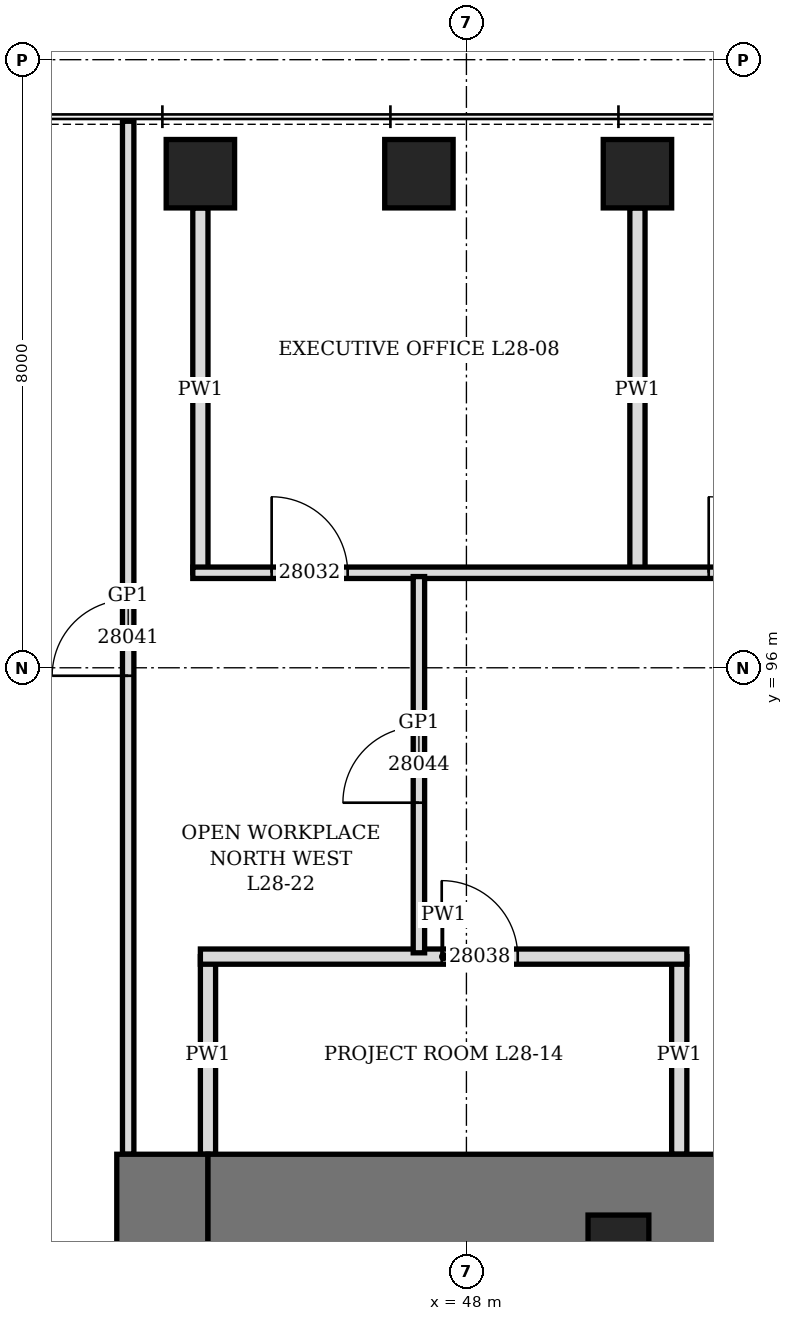
"""IFC4 building model, lengths in metres.
Left out: names, types, materials, properties, quantities, classifications, styles, units other than length and angle.
Written with IfcOpenShell. Run it as: python <this file> out.ifc"""

import sys

from ifc_helpers import new_model, si_unit, direction, frame, frame_2d, origin, origin_2d, place, context, subcontext, project, spatial, rectangle, hollow_rectangle, extrude, element, fill, save


model = new_model("IFC4")
c1 = context("Model", 3, precision=1e-05, world=origin(), true_north=direction((0.0, 1.0)))
c2 = subcontext(c1, "Body", "Model", "MODEL_VIEW")
j1 = project(units=[si_unit("LENGTHUNIT", "METRE"), si_unit("PLANEANGLEUNIT", "RADIAN")], contexts=[c1])
p1 = place(None, origin())
s1 = spatial("IfcSite", under=j1, at=p1, CompositionType="ELEMENT")
p2 = place(p1, origin())
s2 = spatial("IfcBuilding", under=s1, at=p2, CompositionType="ELEMENT")
p3 = place(p2, frame((0.0, 0.0, 129.1)))
s3 = spatial("IfcBuildingStorey", under=s2, at=p3, CompositionType="ELEMENT", Elevation=129.1)
for number, where, z_axis, x_axis in (
    (1, (50.25, 102.5, 0.0), (0.0, 0.0, 1.0), (1.0, 0.0, 0.0)),
    (2, (47.375, 102.5, 0.0), (0.0, 0.0, 1.0), (1.0, 0.0, 0.0)),
    (3, (44.5, 102.5, 0.0), (0.0, 0.0, 1.0), (1.0, 0.0, 0.0)),
):
    element("IfcColumn", number, at=place(p3, frame(where, z_axis=z_axis, x_axis=x_axis)), inside=s3, PredefinedType="COLUMN", context=c2, shape_type="SweptSolid", body=[
        extrude(hollow_rectangle(XDim=0.9, YDim=0.9, WallThickness=0.15, at=origin_2d()), origin(), (0.0, 0.0, 1.0), 4.2),
    ])
p4 = place(p3, frame((44.0, 70.4, 0.0), z_axis=(0.0, 0.0, 1.0), x_axis=(0.0, 1.0, 0.0)))
e4 = element("IfcWall", 4, at=p4, inside=s3, PredefinedType="SHEAR", context=c2, shape_type="SweptSolid", body=[
    extrude(rectangle(XDim=19.2, YDim=1.2, at=frame_2d((9.6, 0.0))), origin(), (0.0, 0.0, 1.0), 4.2),
])
p5 = place(p4, frame((8.6, 0.0, 0.0)))
e5 = element("IfcOpeningElement", 5, at=p5, cuts=e4, PredefinedType="OPENING", context=c2, shape_type="SweptSolid", body=[
    extrude(rectangle(XDim=2.0, YDim=2.4, at=frame_2d((1.0, 1.2))), frame((0.0, 0.61, 0.0), z_axis=(0.0, -1.0, 0.0), x_axis=(1.0, 0.0, 0.0)), (0.0, 0.0, 1.0), 1.22),
])
p6 = place(p3, frame((44.6, 89.0, 0.0), z_axis=(0.0, 0.0, 1.0), x_axis=(1.0, 0.0, 0.0)))
e6 = element("IfcWall", 6, at=p6, inside=s3, PredefinedType="SHEAR", context=c2, shape_type="SweptSolid", body=[
    extrude(rectangle(XDim=22.8, YDim=1.2, at=frame_2d((11.4, 0.0))), origin(), (0.0, 0.0, 1.0), 4.2),
])
p7 = place(p6, frame((7.9, 0.0, 0.0)))
e7 = element("IfcOpeningElement", 7, at=p7, cuts=e6, PredefinedType="OPENING", context=c2, shape_type="SweptSolid", body=[
    extrude(rectangle(XDim=1.0, YDim=2.1, at=frame_2d((0.5, 1.05))), frame((0.0, 0.61, 0.0), z_axis=(0.0, -1.0, 0.0), x_axis=(1.0, 0.0, 0.0)), (0.0, 0.0, 1.0), 1.22),
])
p8 = place(p6, frame((12.025, 0.0, 0.0)))
e8 = element("IfcOpeningElement", 8, at=p8, cuts=e6, PredefinedType="OPENING", context=c2, shape_type="SweptSolid", body=[
    extrude(rectangle(XDim=0.9, YDim=2.1, at=frame_2d((0.45, 1.05))), frame((0.0, 0.61, 0.0), z_axis=(0.0, -1.0, 0.0), x_axis=(1.0, 0.0, 0.0)), (0.0, 0.0, 1.0), 1.22),
])
p9 = place(p6, frame((13.962, 0.0, 0.0)))
e9 = element("IfcOpeningElement", 9, at=p9, cuts=e6, PredefinedType="OPENING", context=c2, shape_type="SweptSolid", body=[
    extrude(rectangle(XDim=0.9, YDim=2.1, at=frame_2d((0.45, 1.05))), frame((0.0, 0.61, 0.0), z_axis=(0.0, -1.0, 0.0), x_axis=(1.0, 0.0, 0.0)), (0.0, 0.0, 1.0), 1.22),
])
p10 = place(p3, frame((50.0, 88.4, 0.0), z_axis=(0.0, 0.0, 1.0), x_axis=(1.0, 0.0, 0.0)))
e10 = element("IfcColumn", 10, at=p10, inside=s3, PredefinedType="COLUMN", context=c2, shape_type="SweptSolid", body=[
    extrude(hollow_rectangle(XDim=0.8, YDim=0.8, WallThickness=0.1, at=origin_2d()), origin(), (0.0, 0.0, 1.0), 4.2),
])
p11 = place(p3, frame((44.5, 97.25, 0.0), z_axis=(0.0, 0.0, 1.0), x_axis=(0.0, 1.0, 0.0)))
e11 = element("IfcWall", 11, at=p11, inside=s3, PredefinedType="PARTITIONING", context=c2, shape_type="SweptSolid", body=[
    extrude(rectangle(XDim=4.8, YDim=0.2, at=frame_2d((2.4, 0.0))), origin(), (0.0, 0.0, 1.0), 2.74),
])
p12 = place(p3, frame((50.25, 97.25, 0.0), z_axis=(0.0, 0.0, 1.0), x_axis=(0.0, 1.0, 0.0)))
e12 = element("IfcWall", 12, at=p12, inside=s3, PredefinedType="PARTITIONING", context=c2, shape_type="SweptSolid", body=[
    extrude(rectangle(XDim=4.8, YDim=0.2, at=frame_2d((2.4, 0.0))), origin(), (0.0, 0.0, 1.0), 3.278),
])
p13 = place(p3, frame((44.6, 89.6, 0.0), z_axis=(0.0, 0.0, 1.0), x_axis=(0.0, 1.0, 0.0)))
e13 = element("IfcWall", 13, at=p13, inside=s3, PredefinedType="PARTITIONING", context=c2, shape_type="SweptSolid", body=[
    extrude(rectangle(XDim=2.6, YDim=0.2, at=frame_2d((1.3, 0.0))), origin(), (0.0, 0.0, 1.0), 2.74),
])
p14 = place(p3, frame((50.8, 89.6, 0.0), z_axis=(0.0, 0.0, 1.0), x_axis=(0.0, 1.0, 0.0)))
e14 = element("IfcWall", 14, at=p14, inside=s3, PredefinedType="PARTITIONING", context=c2, shape_type="SweptSolid", body=[
    extrude(rectangle(XDim=2.6, YDim=0.2, at=frame_2d((1.3, 0.0))), origin(), (0.0, 0.0, 1.0), 4.04),
])
p15 = place(p3, frame((44.5, 92.2, 0.0), z_axis=(0.0, 0.0, 1.0), x_axis=(1.0, 0.0, 0.0)))
e15 = element("IfcWall", 15, at=p15, inside=s3, PredefinedType="PARTITIONING", context=c2, shape_type="SweptSolid", body=[
    extrude(rectangle(XDim=6.4, YDim=0.2, at=frame_2d((3.2, 0.0))), origin(), (0.0, 0.0, 1.0), 4.04),
])
p16 = place(p15, frame((3.175, 0.0, 0.0)))
e16 = element("IfcOpeningElement", 16, at=p16, cuts=e15, PredefinedType="OPENING", context=c2, shape_type="SweptSolid", body=[
    extrude(rectangle(XDim=1.0, YDim=2.1, at=frame_2d((0.5, 1.05))), frame((0.0, 0.11, 0.0), z_axis=(0.0, -1.0, 0.0), x_axis=(1.0, 0.0, 0.0)), (0.0, 0.0, 1.0), 0.22),
])
p17 = place(p3, frame((44.4, 97.25, 0.0), z_axis=(0.0, 0.0, 1.0), x_axis=(1.0, 0.0, 0.0)))
e17 = element("IfcWall", 17, at=p17, inside=s3, PredefinedType="PARTITIONING", context=c2, shape_type="SweptSolid", body=[
    extrude(rectangle(XDim=17.45, YDim=0.15, at=frame_2d((8.725, 0.0))), origin(), (0.0, 0.0, 1.0), 4.04),
])
p18 = place(p17, frame((1.038, 0.0, 0.0)))
e18 = element("IfcOpeningElement", 18, at=p18, cuts=e17, PredefinedType="OPENING", context=c2, shape_type="SweptSolid", body=[
    extrude(rectangle(XDim=1.0, YDim=2.1, at=frame_2d((0.5, 1.05))), frame((0.0, 0.085, 0.0), z_axis=(0.0, -1.0, 0.0), x_axis=(1.0, 0.0, 0.0)), (0.0, 0.0, 1.0), 0.17),
])
p19 = place(p17, frame((6.788, 0.0, 0.0)))
e19 = element("IfcOpeningElement", 19, at=p19, cuts=e17, PredefinedType="OPENING", context=c2, shape_type="SweptSolid", body=[
    extrude(rectangle(XDim=1.0, YDim=2.1, at=frame_2d((0.5, 1.05))), frame((0.0, 0.085, 0.0), z_axis=(0.0, -1.0, 0.0), x_axis=(1.0, 0.0, 0.0)), (0.0, 0.0, 1.0), 0.17),
])
p20 = place(p17, frame((12.538, 0.0, 0.0)))
e20 = element("IfcOpeningElement", 20, at=p20, cuts=e17, PredefinedType="OPENING", context=c2, shape_type="SweptSolid", body=[
    extrude(rectangle(XDim=1.0, YDim=2.1, at=frame_2d((0.5, 1.05))), frame((0.0, 0.085, 0.0), z_axis=(0.0, -1.0, 0.0), x_axis=(1.0, 0.0, 0.0)), (0.0, 0.0, 1.0), 0.17),
])
p21 = place(p3, frame((43.55, 89.6, 0.0), z_axis=(0.0, 0.0, 1.0), x_axis=(0.0, 1.0, 0.0)))
e21 = element("IfcWall", 21, at=p21, inside=s3, PredefinedType="PARTITIONING", context=c2, shape_type="SweptSolid", body=[
    extrude(rectangle(XDim=13.59, YDim=0.15, at=frame_2d((6.795, 0.0))), origin(), (0.0, 0.0, 1.0), 4.04),
])
p22 = place(p21, frame((6.295, 0.0, 0.0)))
e22 = element("IfcOpeningElement", 22, at=p22, cuts=e21, PredefinedType="OPENING", context=c2, shape_type="SweptSolid", body=[
    extrude(rectangle(XDim=1.0, YDim=2.4, at=frame_2d((0.5, 1.2))), frame((0.0, 0.085, 0.0), z_axis=(0.0, -1.0, 0.0), x_axis=(1.0, 0.0, 0.0)), (0.0, 0.0, 1.0), 0.17),
])
p23 = place(p3, frame((47.375, 92.25, 0.0), z_axis=(0.0, 0.0, 1.0), x_axis=(0.0, 1.0, 0.0)))
e23 = element("IfcWall", 23, at=p23, inside=s3, PredefinedType="PARTITIONING", context=c2, shape_type="SweptSolid", body=[
    extrude(rectangle(XDim=4.95, YDim=0.15, at=frame_2d((2.475, 0.0))), origin(), (0.0, 0.0, 1.0), 3.278),
])
p24 = place(p23, frame((1.975, 0.0, 0.0)))
e24 = element("IfcOpeningElement", 24, at=p24, cuts=e23, PredefinedType="OPENING", context=c2, shape_type="SweptSolid", body=[
    extrude(rectangle(XDim=1.0, YDim=2.4, at=frame_2d((0.5, 1.2))), frame((0.0, 0.085, 0.0), z_axis=(0.0, -1.0, 0.0), x_axis=(1.0, 0.0, 0.0)), (0.0, 0.0, 1.0), 0.17),
])
p25 = place(p18, origin())
e25 = element("IfcDoor", 25, at=p25, inside=s3, OperationType="SINGLE_SWING_LEFT", PredefinedType="DOOR", context=c2, shape_type="SweptSolid", body=[
    extrude(rectangle(XDim=1.0, YDim=2.1, at=frame_2d((0.5, 1.05))), frame((0.0, 0.075, 0.0), z_axis=(0.0, -1.0, 0.0), x_axis=(1.0, 0.0, 0.0)), (0.0, 0.0, 1.0), 0.149),
])
fill(e18, e25)
p26 = place(p19, origin())
e26 = element("IfcDoor", 26, at=p26, inside=s3, OperationType="SINGLE_SWING_LEFT", PredefinedType="DOOR", context=c2, shape_type="SweptSolid", body=[
    extrude(rectangle(XDim=1.0, YDim=2.1, at=frame_2d((0.5, 1.05))), frame((0.0, 0.075, 0.0), z_axis=(0.0, -1.0, 0.0), x_axis=(1.0, 0.0, 0.0)), (0.0, 0.0, 1.0), 0.149),
])
fill(e19, e26)
p27 = place(p16, origin())
e27 = element("IfcDoor", 27, at=p27, inside=s3, OperationType="SINGLE_SWING_LEFT", PredefinedType="DOOR", context=c2, shape_type="SweptSolid", body=[
    extrude(rectangle(XDim=1.0, YDim=2.1, at=frame_2d((0.5, 1.05))), frame((0.0, 0.1, 0.0), z_axis=(0.0, -1.0, 0.0), x_axis=(1.0, 0.0, 0.0)), (0.0, 0.0, 1.0), 0.199),
])
fill(e16, e27)
p28 = place(p22, origin())
e28 = element("IfcDoor", 28, at=p28, inside=s3, OperationType="SINGLE_SWING_RIGHT", PredefinedType="DOOR", context=c2, shape_type="SweptSolid", body=[
    extrude(rectangle(XDim=1.0, YDim=2.4, at=frame_2d((0.5, 1.2))), frame((0.0, 0.075, 0.0), z_axis=(0.0, -1.0, 0.0), x_axis=(1.0, 0.0, 0.0)), (0.0, 0.0, 1.0), 0.149),
])
fill(e22, e28)
p29 = place(p24, origin())
e29 = element("IfcDoor", 29, at=p29, inside=s3, OperationType="SINGLE_SWING_RIGHT", PredefinedType="DOOR", context=c2, shape_type="SweptSolid", body=[
    extrude(rectangle(XDim=1.0, YDim=2.4, at=frame_2d((0.5, 1.2))), frame((0.0, 0.075, 0.0), z_axis=(0.0, -1.0, 0.0), x_axis=(1.0, 0.0, 0.0)), (0.0, 0.0, 1.0), 0.149),
])
fill(e24, e29)
save(model, sys.argv[1])
